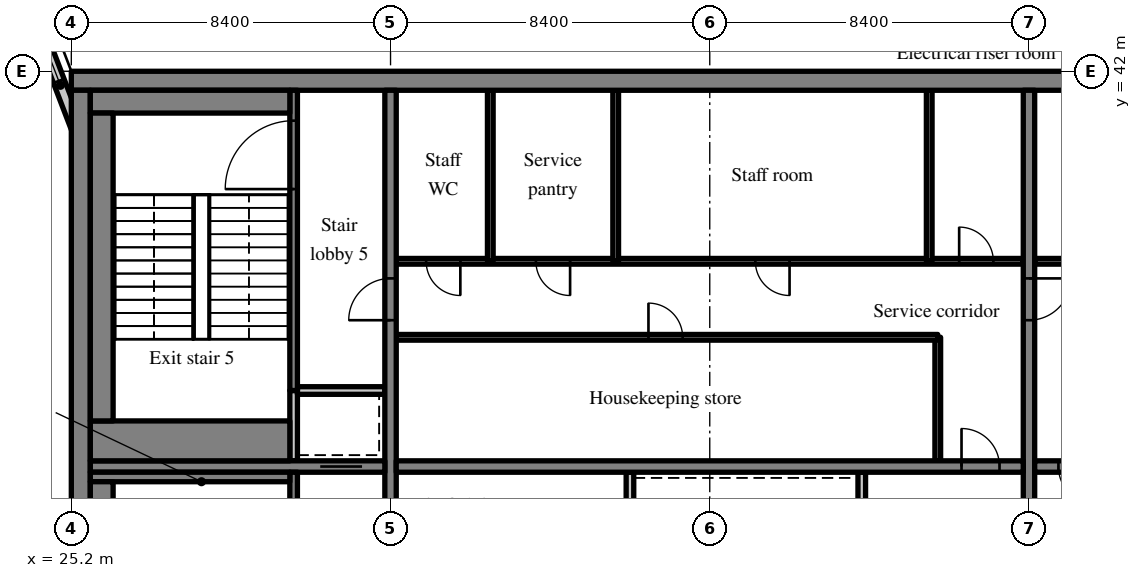
"""IFC4 building model, lengths in metres.
Left out: names, types, materials, properties, quantities, classifications, styles, units other than length and angle.
Written with IfcOpenShell. Run it as: python <this file> out.ifc"""

import sys

from ifc_helpers import new_model, si_unit, direction, frame, frame_2d, origin, place, context, subcontext, project, spatial, rectangle, extrude, source, transform, mapped, element, fill, save


model = new_model("IFC4")
c1 = context("Model", 3, precision=1e-05, world=origin(), true_north=direction((0.0, 1.0)))
c2 = subcontext(c1, "Body", "Model", "MODEL_VIEW")
j1 = project(units=[si_unit("LENGTHUNIT", "METRE"), si_unit("PLANEANGLEUNIT", "RADIAN")], contexts=[c1])
p1 = place(None, origin())
s1 = spatial("IfcSite", under=j1, at=p1, CompositionType="ELEMENT")
p2 = place(p1, origin())
s2 = spatial("IfcBuilding", under=s1, at=p2, CompositionType="ELEMENT")
p3 = place(p2, frame((0.0, 0.0, 285.7)))
s3 = spatial("IfcBuildingStorey", under=s2, at=p3, CompositionType="ELEMENT", Elevation=285.7)
m1 = source(origin(), c2, "Body", "SweptSolid", [
    extrude(rectangle(XDim=50.4, YDim=0.5, at=frame_2d((25.2, 0.0))), origin(), (0.0, 0.0, 1.0), 3.72),
])
p4 = place(p3, frame((25.2, 41.75, 0.0), z_axis=(0.0, 0.0, 1.0), x_axis=(1.0, 0.0, 0.0)))
e1 = element("IfcWall", 1, at=p4, inside=s3, PredefinedType="SHEAR", context=c2, shape_type="MappedRepresentation", body=[
    mapped(m1, transform((0.0, 0.0, 0.0), scale=1.0)),
])
m2 = source(origin(), c2, "Body", "SweptSolid", [
    extrude(rectangle(XDim=19.0, YDim=0.5, at=frame_2d((9.5, 0.0))), origin(), (0.0, 0.0, 1.0), 3.72),
])
p5 = place(p3, frame((25.45, 22.5, 0.0), z_axis=(0.0, 0.0, 1.0), x_axis=(0.0, 1.0, 0.0)))
e2 = element("IfcWall", 2, at=p5, inside=s3, PredefinedType="SHEAR", context=c2, shape_type="MappedRepresentation", body=[
    mapped(m2, transform((0.0, 0.0, 0.0), scale=1.0)),
])
m3 = source(origin(), c2, "Body", "SweptSolid", [
    extrude(rectangle(XDim=19.0, YDim=0.3, at=frame_2d((9.5, 0.0))), origin(), (0.0, 0.0, 1.0), 3.72),
])
p6 = place(p3, frame((33.6, 22.5, 0.0), z_axis=(0.0, 0.0, 1.0), x_axis=(0.0, 1.0, 0.0)))
e3 = element("IfcWall", 3, at=p6, inside=s3, PredefinedType="SHEAR", context=c2, shape_type="MappedRepresentation", body=[
    mapped(m3, transform((0.0, 0.0, 0.0), scale=1.0)),
])
m4 = source(origin(), c2, "Body", "SweptSolid", [
    extrude(rectangle(XDim=1.1, YDim=2.1, at=frame_2d((0.55, 1.05))), frame((0.0, 0.16, 0.0), z_axis=(0.0, -1.0, 0.0), x_axis=(1.0, 0.0, 0.0)), (0.0, 0.0, 1.0), 0.32),
])
p7 = place(p6, frame((12.95, 0.0, 0.0)))
e4 = element("IfcOpeningElement", 4, at=p7, cuts=e3, PredefinedType="OPENING", context=c2, shape_type="MappedRepresentation", body=[
    mapped(m4, transform((0.0, 0.0, 0.0), scale=1.0)),
])
p8 = place(p3, frame((50.4, 22.5, 0.0), z_axis=(0.0, 0.0, 1.0), x_axis=(0.0, 1.0, 0.0)))
e5 = element("IfcWall", 5, at=p8, inside=s3, PredefinedType="SHEAR", context=c2, shape_type="MappedRepresentation", body=[
    mapped(m3, transform((0.0, 0.0, 0.0), scale=1.0)),
])
p9 = place(p8, frame((12.95, 0.0, 0.0)))
e6 = element("IfcOpeningElement", 6, at=p9, cuts=e5, PredefinedType="OPENING", context=c2, shape_type="MappedRepresentation", body=[
    mapped(m4, transform((0.0, 0.0, 0.0), scale=1.0)),
])
m5 = source(origin(), c2, "Body", "SweptSolid", [
    extrude(rectangle(XDim=7.75, YDim=0.3, at=frame_2d((3.875, 0.0))), origin(), (0.0, 0.0, 1.0), 3.72),
])
p10 = place(p3, frame((25.7, 31.6, 0.0), z_axis=(0.0, 0.0, 1.0), x_axis=(1.0, 0.0, 0.0)))
e7 = element("IfcWall", 7, at=p10, inside=s3, PredefinedType="SHEAR", context=c2, shape_type="MappedRepresentation", body=[
    mapped(m5, transform((0.0, 0.0, 0.0), scale=1.0)),
])
p11 = place(p10, frame((6.05, 0.0, 0.0)))
e8 = element("IfcOpeningElement", 8, at=p11, cuts=e7, PredefinedType="OPENING", context=c2, shape_type="MappedRepresentation", body=[
    mapped(m4, transform((0.0, 0.0, 0.0), scale=1.0)),
])
m6 = source(origin(), c2, "Body", "SweptSolid", [
    extrude(rectangle(XDim=16.5, YDim=0.3, at=frame_2d((8.25, 0.0))), origin(), (0.0, 0.0, 1.0), 3.72),
])
p12 = place(p3, frame((33.75, 31.6, 0.0), z_axis=(0.0, 0.0, 1.0), x_axis=(1.0, 0.0, 0.0)))
e9 = element("IfcWall", 9, at=p12, inside=s3, PredefinedType="SHEAR", context=c2, shape_type="MappedRepresentation", body=[
    mapped(m6, transform((0.0, 0.0, 0.0), scale=1.0)),
])
m7 = source(origin(), c2, "Body", "SweptSolid", [
    extrude(rectangle(XDim=1.0, YDim=2.1, at=frame_2d((0.5, 1.05))), frame((0.0, 0.16, 0.0), z_axis=(0.0, -1.0, 0.0), x_axis=(1.0, 0.0, 0.0)), (0.0, 0.0, 1.0), 0.32),
])
p13 = place(p12, frame((14.875, 0.0, 0.0)))
e10 = element("IfcOpeningElement", 10, at=p13, cuts=e9, PredefinedType="OPENING", context=c2, shape_type="MappedRepresentation", body=[
    mapped(m7, transform((0.0, 0.0, 0.0), scale=1.0)),
])
p14 = place(p3, frame((50.55, 31.6, 0.0), z_axis=(0.0, 0.0, 1.0), x_axis=(1.0, 0.0, 0.0)))
e11 = element("IfcWall", 11, at=p14, inside=s3, PredefinedType="SHEAR", context=c2, shape_type="MappedRepresentation", body=[
    mapped(m6, transform((0.0, 0.0, 0.0), scale=1.0)),
])
p15 = place(p14, frame((0.625, 0.0, 0.0)))
e12 = element("IfcOpeningElement", 12, at=p15, cuts=e11, PredefinedType="OPENING", context=c2, shape_type="MappedRepresentation", body=[
    mapped(m7, transform((0.0, 0.0, 0.0), scale=1.0)),
])
m8 = source(origin(), c2, "Body", "SweptSolid", [
    extrude(rectangle(XDim=3.559, YDim=0.3, at=frame_2d((1.78, 0.0))), origin(), (0.0, 0.0, 1.0), 3.72),
])
p16 = place(p3, frame((25.55, 39.969, 0.0), z_axis=(0.0, 0.0, 1.0), x_axis=(-0.35779745313, 0.933799219604, 0.0)))
e13 = element("IfcWall", 13, at=p16, inside=s3, PredefinedType="SOLIDWALL", context=c2, shape_type="MappedRepresentation", body=[
    mapped(m8, transform((0.0, 0.0, 0.0), scale=1.0)),
])
m9 = source(origin(), c2, "Body", "SweptSolid", [
    extrude(rectangle(XDim=1.5, YDim=2.0, at=frame_2d((0.75, 1.0))), frame((0.0, 0.16, 0.0), z_axis=(0.0, -1.0, 0.0), x_axis=(1.0, 0.0, 0.0)), (0.0, 0.0, 1.0), 0.32),
])
p17 = place(p16, frame((1.903, 0.0, 0.9)))
e14 = element("IfcOpeningElement", 14, at=p17, cuts=e13, PredefinedType="OPENING", context=c2, shape_type="MappedRepresentation", body=[
    mapped(m9, transform((0.0, 0.0, 0.0), scale=1.0)),
])
m10 = source(origin(), c2, "Body", "SweptSolid", [
    extrude(rectangle(XDim=8.95, YDim=0.2, at=frame_2d((4.475, 0.0))), origin(), (0.0, 0.0, 1.0), 3.72),
])
p18 = place(p3, frame((39.9, 22.5, 0.0), z_axis=(0.0, 0.0, 1.0), x_axis=(0.0, 1.0, 0.0)))
e15 = element("IfcWall", 15, at=p18, inside=s3, PredefinedType="PARTITIONING", context=c2, shape_type="MappedRepresentation", body=[
    mapped(m10, transform((0.0, 0.0, 0.0), scale=1.0)),
])
m11 = source(origin(), c2, "Body", "SweptSolid", [
    extrude(rectangle(XDim=0.9, YDim=2.1, at=frame_2d((0.45, 1.05))), frame((0.0, 0.11, 0.0), z_axis=(0.0, -1.0, 0.0), x_axis=(1.0, 0.0, 0.0)), (0.0, 0.0, 1.0), 0.22),
])
p19 = place(p18, frame((4.05, 0.0, 0.0)))
e16 = element("IfcOpeningElement", 16, at=p19, cuts=e15, PredefinedType="OPENING", context=c2, shape_type="MappedRepresentation", body=[
    mapped(m11, transform((0.0, 0.0, 0.0), scale=1.0)),
])
m12 = source(origin(), c2, "Body", "SweptSolid", [
    extrude(rectangle(XDim=2.65, YDim=0.2, at=frame_2d((1.325, 0.0))), origin(), (0.0, 0.0, 1.0), 3.72),
])
p20 = place(p3, frame((46.0, 28.8, 0.0), z_axis=(0.0, 0.0, 1.0), x_axis=(0.0, 1.0, 0.0)))
e17 = element("IfcWall", 17, at=p20, inside=s3, PredefinedType="SOLIDWALL", context=c2, shape_type="MappedRepresentation", body=[
    mapped(m12, transform((0.0, 0.0, 0.0), scale=1.0)),
])
m13 = source(origin(), c2, "Body", "SweptSolid", [
    extrude(rectangle(XDim=3.25, YDim=0.15, at=frame_2d((1.625, 0.0))), origin(), (0.0, 0.0, 1.0), 3.72),
])
p21 = place(p3, frame((48.0, 31.75, 0.0), z_axis=(0.0, 0.0, 1.0), x_axis=(0.0, 1.0, 0.0)))
e18 = element("IfcWall", 18, at=p21, inside=s3, PredefinedType="PARTITIONING", context=c2, shape_type="MappedRepresentation", body=[
    mapped(m13, transform((0.0, 0.0, 0.0), scale=1.0)),
])
m14 = source(origin(), c2, "Body", "SweptSolid", [
    extrude(rectangle(XDim=14.25, YDim=0.15, at=frame_2d((7.125, 0.0))), origin(), (0.0, 0.0, 1.0), 3.72),
])
p22 = place(p3, frame((33.75, 35.0, 0.0), z_axis=(0.0, 0.0, 1.0), x_axis=(1.0, 0.0, 0.0)))
e19 = element("IfcWall", 19, at=p22, inside=s3, PredefinedType="PARTITIONING", context=c2, shape_type="MappedRepresentation", body=[
    mapped(m14, transform((0.0, 0.0, 0.0), scale=1.0)),
])
m15 = source(origin(), c2, "Body", "SweptSolid", [
    extrude(rectangle(XDim=0.9, YDim=2.1, at=frame_2d((0.45, 1.05))), frame((0.0, 0.085, 0.0), z_axis=(0.0, -1.0, 0.0), x_axis=(1.0, 0.0, 0.0)), (0.0, 0.0, 1.0), 0.17),
])
p23 = place(p22, frame((6.637, 0.0, 0.0)))
e20 = element("IfcOpeningElement", 20, at=p23, cuts=e19, PredefinedType="OPENING", context=c2, shape_type="MappedRepresentation", body=[
    mapped(m15, transform((0.0, 0.0, 0.0), scale=1.0)),
])
m16 = source(origin(), c2, "Body", "SweptSolid", [
    extrude(rectangle(XDim=16.5, YDim=0.15, at=frame_2d((8.25, 0.0))), origin(), (0.0, 0.0, 1.0), 3.72),
])
p24 = place(p3, frame((33.75, 37.0, 0.0), z_axis=(0.0, 0.0, 1.0), x_axis=(1.0, 0.0, 0.0)))
e21 = element("IfcWall", 21, at=p24, inside=s3, PredefinedType="PARTITIONING", context=c2, shape_type="MappedRepresentation", body=[
    mapped(m16, transform((0.0, 0.0, 0.0), scale=1.0)),
])
p25 = place(p24, frame((0.787, 0.0, 0.0)))
e22 = element("IfcOpeningElement", 22, at=p25, cuts=e21, PredefinedType="OPENING", context=c2, shape_type="MappedRepresentation", body=[
    mapped(m15, transform((0.0, 0.0, 0.0), scale=1.0)),
])
p26 = place(p24, frame((3.675, 0.0, 0.0)))
e23 = element("IfcOpeningElement", 23, at=p26, cuts=e21, PredefinedType="OPENING", context=c2, shape_type="MappedRepresentation", body=[
    mapped(m15, transform((0.0, 0.0, 0.0), scale=1.0)),
])
p27 = place(p24, frame((9.45, 0.0, 0.0)))
e24 = element("IfcOpeningElement", 24, at=p27, cuts=e21, PredefinedType="OPENING", context=c2, shape_type="MappedRepresentation", body=[
    mapped(m15, transform((0.0, 0.0, 0.0), scale=1.0)),
])
p28 = place(p24, frame((14.813, 0.0, 0.0)))
e25 = element("IfcOpeningElement", 25, at=p28, cuts=e21, PredefinedType="OPENING", context=c2, shape_type="MappedRepresentation", body=[
    mapped(m15, transform((0.0, 0.0, 0.0), scale=1.0)),
])
m17 = source(origin(), c2, "Body", "SweptSolid", [
    extrude(rectangle(XDim=4.5, YDim=0.15, at=frame_2d((2.25, 0.0))), origin(), (0.0, 0.0, 1.0), 3.72),
])
for number, where, z_axis, x_axis in (
    (26, (36.225, 37.0, 0.0), (0.0, 0.0, 1.0), (0.0, 1.0, 0.0)),
    (27, (39.525, 37.0, 0.0), (0.0, 0.0, 1.0), (0.0, 1.0, 0.0)),
    (28, (47.775, 37.0, 0.0), (0.0, 0.0, 1.0), (0.0, 1.0, 0.0)),
):
    element("IfcWall", number, at=place(p3, frame(where, z_axis=z_axis, x_axis=x_axis)), inside=s3, PredefinedType="PARTITIONING", context=c2, shape_type="MappedRepresentation", body=[
        mapped(m17, transform((0.0, 0.0, 0.0), scale=1.0)),
    ])
p29 = place(p3, frame((67.05, 37.0, 0.0), z_axis=(0.0, 0.0, 1.0), x_axis=(-1.0, 0.0, 0.0)))
e29 = element("IfcWall", 29, at=p29, inside=s3, PredefinedType="PARTITIONING", context=c2, shape_type="MappedRepresentation", body=[
    mapped(m16, transform((0.0, 0.0, 0.0), scale=1.0)),
])
p30 = place(p29, frame((6.563, 0.0, 0.0)))
e30 = element("IfcOpeningElement", 30, at=p30, cuts=e29, PredefinedType="OPENING", context=c2, shape_type="MappedRepresentation", body=[
    mapped(m15, transform((0.0, 0.0, 0.0), scale=1.0)),
])
p31 = place(p29, frame((14.813, 0.0, 0.0)))
e31 = element("IfcOpeningElement", 31, at=p31, cuts=e29, PredefinedType="OPENING", context=c2, shape_type="MappedRepresentation", body=[
    mapped(m15, transform((0.0, 0.0, 0.0), scale=1.0)),
])
m18 = source(origin(), c2, "Body", "SweptSolid", [
    extrude(rectangle(XDim=8.95, YDim=0.2, at=frame_2d((4.475, 0.0))), origin(), (0.0, 0.0, 1.0), 3.72),
])
p32 = place(p3, frame((31.05, 22.5, 0.0), z_axis=(0.0, 0.0, 1.0), x_axis=(0.0, 1.0, 0.0)))
e32 = element("IfcWall", 32, at=p32, inside=s3, PredefinedType="SOLIDWALL", context=c2, shape_type="MappedRepresentation", body=[
    mapped(m18, transform((0.0, 0.0, 0.0), scale=1.0)),
])
m19 = source(origin(), c2, "Body", "SweptSolid", [
    extrude(rectangle(XDim=1.2, YDim=2.1, at=frame_2d((0.6, 1.05))), frame((0.0, 0.11, 0.0), z_axis=(0.0, -1.0, 0.0), x_axis=(1.0, 0.0, 0.0)), (0.0, 0.0, 1.0), 0.22),
])
p33 = place(p32, frame((7.0, 0.0, 0.0)))
e33 = element("IfcOpeningElement", 33, at=p33, cuts=e32, PredefinedType="OPENING", context=c2, shape_type="MappedRepresentation", body=[
    mapped(m19, transform((0.0, 0.0, 0.0), scale=1.0)),
])
m20 = source(origin(), c2, "Body", "SweptSolid", [
    extrude(rectangle(XDim=1.85, YDim=0.2, at=frame_2d((0.925, 0.0))), origin(), (0.0, 0.0, 1.0), 3.72),
])
p34 = place(p3, frame((31.05, 31.75, 0.0), z_axis=(0.0, 0.0, 1.0), x_axis=(0.0, 1.0, 0.0)))
e34 = element("IfcWall", 34, at=p34, inside=s3, PredefinedType="SOLIDWALL", context=c2, shape_type="MappedRepresentation", body=[
    mapped(m20, transform((0.0, 0.0, 0.0), scale=1.0)),
])
m21 = source(origin(), c2, "Body", "SweptSolid", [
    extrude(rectangle(XDim=2.3, YDim=0.2, at=frame_2d((1.15, 0.0))), origin(), (0.0, 0.0, 1.0), 3.72),
])
p35 = place(p3, frame((31.15, 33.6, 0.0), z_axis=(0.0, 0.0, 1.0), x_axis=(1.0, 0.0, 0.0)))
e35 = element("IfcWall", 35, at=p35, inside=s3, PredefinedType="SOLIDWALL", context=c2, shape_type="MappedRepresentation", body=[
    mapped(m21, transform((0.0, 0.0, 0.0), scale=1.0)),
])
m22 = source(origin(), c2, "Body", "SweptSolid", [
    extrude(rectangle(XDim=7.9, YDim=0.2, at=frame_2d((3.95, 0.0))), origin(), (0.0, 0.0, 1.0), 3.72),
])
p36 = place(p3, frame((31.05, 33.6, 0.0), z_axis=(0.0, 0.0, 1.0), x_axis=(0.0, 1.0, 0.0)))
e36 = element("IfcWall", 36, at=p36, inside=s3, PredefinedType="SOLIDWALL", context=c2, shape_type="MappedRepresentation", body=[
    mapped(m22, transform((0.0, 0.0, 0.0), scale=1.0)),
])
m23 = source(origin(), c2, "Body", "SweptSolid", [
    extrude(rectangle(XDim=1.8, YDim=2.1, at=frame_2d((0.9, 1.05))), frame((0.0, 0.11, 0.0), z_axis=(0.0, -1.0, 0.0), x_axis=(1.0, 0.0, 0.0)), (0.0, 0.0, 1.0), 0.22),
])
p37 = place(p36, frame((5.3, 0.0, 0.0)))
e37 = element("IfcOpeningElement", 37, at=p37, cuts=e36, PredefinedType="OPENING", context=c2, shape_type="MappedRepresentation", body=[
    mapped(m23, transform((0.0, 0.0, 0.0), scale=1.0)),
])
m24 = source(origin(), c2, "Body", "SweptSolid", [
    extrude(rectangle(XDim=5.25, YDim=0.25, at=frame_2d((2.625, 0.0))), origin(), (0.0, 0.0, 1.0), 3.72),
])
p38 = place(p3, frame((25.7, 31.325, 0.0), z_axis=(0.0, 0.0, 1.0), x_axis=(1.0, 0.0, 0.0)))
e38 = element("IfcWall", 38, at=p38, inside=s3, PredefinedType="SOLIDWALL", context=c2, shape_type="MappedRepresentation", body=[
    mapped(m24, transform((0.0, 0.0, 0.0), scale=1.0)),
])
m25 = source(origin(), c2, "Body", "SweptSolid", [
    extrude(rectangle(XDim=8.1, YDim=0.6, at=frame_2d((4.05, 0.0))), origin(), (0.0, 0.0, 1.0), 3.72),
])
p39 = place(p3, frame((26.0, 23.1, 0.0), z_axis=(0.0, 0.0, 1.0), x_axis=(0.0, 1.0, 0.0)))
e39 = element("IfcWall", 39, at=p39, inside=s3, PredefinedType="SOLIDWALL", context=c2, shape_type="MappedRepresentation", body=[
    mapped(m25, transform((0.0, 0.0, 0.0), scale=1.0)),
])
m26 = source(origin(), c2, "Body", "SweptSolid", [
    extrude(rectangle(XDim=5.25, YDim=0.6, at=frame_2d((2.625, 0.0))), origin(), (0.0, 0.0, 1.0), 3.72),
])
p40 = place(p3, frame((25.7, 41.2, 0.0), z_axis=(0.0, 0.0, 1.0), x_axis=(1.0, 0.0, 0.0)))
e40 = element("IfcWall", 40, at=p40, inside=s3, PredefinedType="SOLIDWALL", context=c2, shape_type="MappedRepresentation", body=[
    mapped(m26, transform((0.0, 0.0, 0.0), scale=1.0)),
])
m27 = source(origin(), c2, "Body", "SweptSolid", [
    extrude(rectangle(XDim=5.25, YDim=1.05, at=frame_2d((2.625, 0.0))), origin(), (0.0, 0.0, 1.0), 3.72),
])
p41 = place(p3, frame((25.7, 32.275, 0.0), z_axis=(0.0, 0.0, 1.0), x_axis=(1.0, 0.0, 0.0)))
e41 = element("IfcWall", 41, at=p41, inside=s3, PredefinedType="SOLIDWALL", context=c2, shape_type="MappedRepresentation", body=[
    mapped(m27, transform((0.0, 0.0, 0.0), scale=1.0)),
])
p42 = place(p3, frame((26.0, 32.8, 0.0), z_axis=(0.0, 0.0, 1.0), x_axis=(0.0, 1.0, 0.0)))
e42 = element("IfcWall", 42, at=p42, inside=s3, PredefinedType="SOLIDWALL", context=c2, shape_type="MappedRepresentation", body=[
    mapped(m25, transform((0.0, 0.0, 0.0), scale=1.0)),
])
m28 = source(origin(), c2, "Body", "SweptSolid", [
    extrude(rectangle(XDim=1.5, YDim=2.0, at=frame_2d((0.75, 1.0))), frame((0.0, 0.03, 0.0), z_axis=(0.0, -1.0, 0.0), x_axis=(1.0, 0.0, 0.0)), (0.0, 0.0, 1.0), 0.06),
])
p43 = place(p17, origin())
e43 = element("IfcWindow", 43, at=p43, inside=s3, PartitioningType="SINGLE_PANEL", PredefinedType="WINDOW", context=c2, shape_type="MappedRepresentation", body=[
    mapped(m28, transform((0.0, 0.0, 0.0), scale=1.0)),
])
fill(e14, e43)
m29 = source(origin(), c2, "Body", "SweptSolid", [
    extrude(rectangle(XDim=1.0, YDim=2.1, at=frame_2d((0.5, 1.05))), frame((0.0, 0.025, 0.0), z_axis=(0.0, -1.0, 0.0), x_axis=(1.0, 0.0, 0.0)), (0.0, 0.0, 1.0), 0.05),
])
p44 = place(p13, origin())
e44 = element("IfcDoor", 44, at=p44, inside=s3, OperationType="SINGLE_SWING_LEFT", PredefinedType="DOOR", context=c2, shape_type="MappedRepresentation", body=[
    mapped(m29, transform((0.0, 0.0, 0.0), scale=1.0)),
])
fill(e10, e44)
m30 = source(origin(), c2, "Body", "SweptSolid", [
    extrude(rectangle(XDim=0.9, YDim=2.1, at=frame_2d((0.45, 1.05))), frame((0.0, 0.025, 0.0), z_axis=(0.0, -1.0, 0.0), x_axis=(1.0, 0.0, 0.0)), (0.0, 0.0, 1.0), 0.05),
])
p45 = place(p23, origin())
e45 = element("IfcDoor", 45, at=p45, inside=s3, OperationType="SINGLE_SWING_LEFT", PredefinedType="DOOR", context=c2, shape_type="MappedRepresentation", body=[
    mapped(m30, transform((0.0, 0.0, 0.0), scale=1.0)),
])
fill(e20, e45)
p46 = place(p25, origin())
e46 = element("IfcDoor", 46, at=p46, inside=s3, OperationType="SINGLE_SWING_RIGHT", PredefinedType="DOOR", context=c2, shape_type="MappedRepresentation", body=[
    mapped(m30, transform((0.0, 0.0, 0.0), scale=1.0)),
])
fill(e22, e46)
p47 = place(p26, origin())
e47 = element("IfcDoor", 47, at=p47, inside=s3, OperationType="SINGLE_SWING_RIGHT", PredefinedType="DOOR", context=c2, shape_type="MappedRepresentation", body=[
    mapped(m30, transform((0.0, 0.0, 0.0), scale=1.0)),
])
fill(e23, e47)
p48 = place(p27, origin())
e48 = element("IfcDoor", 48, at=p48, inside=s3, OperationType="SINGLE_SWING_RIGHT", PredefinedType="DOOR", context=c2, shape_type="MappedRepresentation", body=[
    mapped(m30, transform((0.0, 0.0, 0.0), scale=1.0)),
])
fill(e24, e48)
p49 = place(p28, origin())
e49 = element("IfcDoor", 49, at=p49, inside=s3, OperationType="SINGLE_SWING_LEFT", PredefinedType="DOOR", context=c2, shape_type="MappedRepresentation", body=[
    mapped(m30, transform((0.0, 0.0, 0.0), scale=1.0)),
])
fill(e25, e49)
p50 = place(p15, origin())
e50 = element("IfcDoor", 50, at=p50, inside=s3, OperationType="SINGLE_SWING_RIGHT", PredefinedType="DOOR", context=c2, shape_type="MappedRepresentation", body=[
    mapped(m29, transform((0.0, 0.0, 0.0), scale=1.0)),
])
fill(e12, e50)
m31 = source(origin(), c2, "Body", "SweptSolid", [
    extrude(rectangle(XDim=1.1, YDim=2.1, at=frame_2d((0.55, 1.05))), frame((0.0, 0.025, 0.0), z_axis=(0.0, -1.0, 0.0), x_axis=(1.0, 0.0, 0.0)), (0.0, 0.0, 1.0), 0.05),
])
p51 = place(p11, origin())
e51 = element("IfcDoor", 51, at=p51, inside=s3, OperationType="SLIDING_TO_RIGHT", PredefinedType="DOOR", context=c2, shape_type="MappedRepresentation", body=[
    mapped(m31, transform((0.0, 0.0, 0.0), scale=1.0)),
])
fill(e8, e51)
m32 = source(origin(), c2, "Body", "SweptSolid", [
    extrude(rectangle(XDim=1.8, YDim=2.1, at=frame_2d((0.9, 1.05))), frame((0.0, 0.025, 0.0), z_axis=(0.0, -1.0, 0.0), x_axis=(1.0, 0.0, 0.0)), (0.0, 0.0, 1.0), 0.05),
])
p52 = place(p37, origin())
e52 = element("IfcDoor", 52, at=p52, inside=s3, OperationType="SINGLE_SWING_LEFT", PredefinedType="DOOR", context=c2, shape_type="MappedRepresentation", body=[
    mapped(m32, transform((0.0, 0.0, 0.0), scale=1.0)),
])
fill(e37, e52)
p53 = place(p7, origin())
e53 = element("IfcDoor", 53, at=p53, inside=s3, OperationType="SINGLE_SWING_LEFT", PredefinedType="DOOR", context=c2, shape_type="MappedRepresentation", body=[
    mapped(m31, transform((0.0, 0.0, 0.0), scale=1.0)),
])
fill(e4, e53)
p54 = place(p9, origin())
e54 = element("IfcDoor", 54, at=p54, inside=s3, OperationType="SINGLE_SWING_RIGHT", PredefinedType="DOOR", context=c2, shape_type="MappedRepresentation", body=[
    mapped(m31, transform((0.0, 0.0, 0.0), scale=1.0)),
])
fill(e6, e54)
save(model, sys.argv[1])
